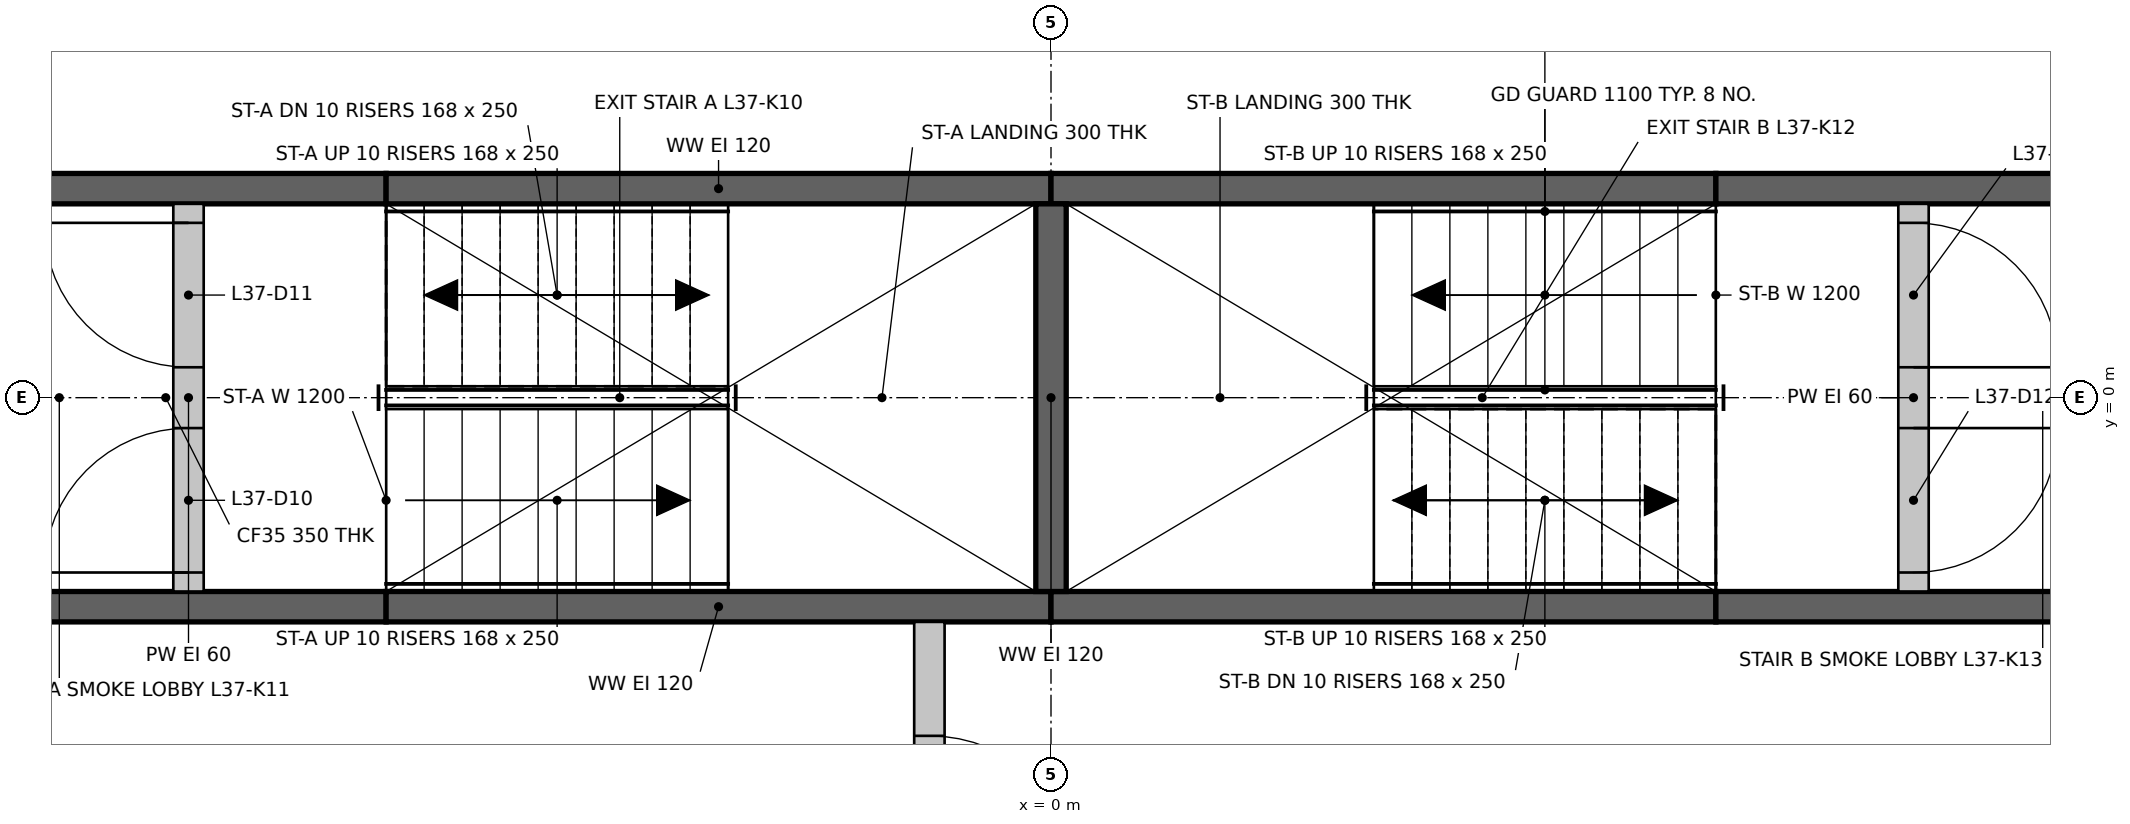
"""IFC4 building model, lengths in metres.
Left out: names, types, materials, properties, quantities, classifications, styles, units other than length and angle.
Written with IfcOpenShell. Run it as: python <this file> out.ifc"""

import sys

from ifc_helpers import new_model, si_unit, direction, frame, frame_2d, origin, place, context, subcontext, project, spatial, rectangle, extrude, element, fill, save


model = new_model("IFC4")
c1 = context("Model", 3, precision=1e-05, world=origin(), true_north=direction((0.0, 1.0)))
c2 = subcontext(c1, "Body", "Model", "MODEL_VIEW")
j1 = project(units=[si_unit("LENGTHUNIT", "METRE"), si_unit("PLANEANGLEUNIT", "RADIAN")], contexts=[c1])
p1 = place(None, origin())
s1 = spatial("IfcSite", under=j1, at=p1, CompositionType="ELEMENT")
p2 = place(p1, origin())
s2 = spatial("IfcBuilding", under=s1, at=p2, CompositionType="ELEMENT")
p3 = place(p2, frame((0.0, 0.0, 147.75)))
s3 = spatial("IfcBuildingStorey", under=s2, at=p3, CompositionType="ELEMENT", Elevation=147.75)
p4 = place(p3, frame((-7.274, -1.375, 0.0), z_axis=(0.0, 0.0, 1.0), x_axis=(1.0, 0.0, 0.0)))
e1 = element("IfcWall", 1, at=p4, inside=s3, PredefinedType="SHEAR", context=c2, shape_type="SweptSolid", body=[
    extrude(rectangle(XDim=2.9, YDim=0.2, at=frame_2d((1.45, 0.0))), origin(), (0.0, 0.0, 1.0), 3.0),
])
for number, where, z_axis, x_axis in (
    (2, (-4.374, -1.375, 0.0), (0.0, 0.0, 1.0), (1.0, 0.0, 0.0)),
    (3, (0.0, -1.375, 0.0), (0.0, 0.0, 1.0), (1.0, 0.0, 0.0)),
):
    element("IfcWall", number, at=place(p3, frame(where, z_axis=z_axis, x_axis=x_axis)), inside=s3, PredefinedType="SHEAR", context=c2, shape_type="SweptSolid", body=[
        extrude(rectangle(XDim=4.374, YDim=0.2, at=frame_2d((2.187, 0.0))), origin(), (0.0, 0.0, 1.0), 3.0),
    ])
for number, where, z_axis, x_axis in (
    (4, (4.374, -1.375, 0.0), (0.0, 0.0, 1.0), (1.0, 0.0, 0.0)),
    (5, (-7.274, 1.375, 0.0), (0.0, 0.0, 1.0), (1.0, 0.0, 0.0)),
):
    element("IfcWall", number, at=place(p3, frame(where, z_axis=z_axis, x_axis=x_axis)), inside=s3, PredefinedType="SHEAR", context=c2, shape_type="SweptSolid", body=[
        extrude(rectangle(XDim=2.9, YDim=0.2, at=frame_2d((1.45, 0.0))), origin(), (0.0, 0.0, 1.0), 3.0),
    ])
for number, where, z_axis, x_axis in (
    (6, (-4.374, 1.375, 0.0), (0.0, 0.0, 1.0), (1.0, 0.0, 0.0)),
    (7, (0.0, 1.375, 0.0), (0.0, 0.0, 1.0), (1.0, 0.0, 0.0)),
):
    element("IfcWall", number, at=place(p3, frame(where, z_axis=z_axis, x_axis=x_axis)), inside=s3, PredefinedType="SHEAR", context=c2, shape_type="SweptSolid", body=[
        extrude(rectangle(XDim=4.374, YDim=0.2, at=frame_2d((2.187, 0.0))), origin(), (0.0, 0.0, 1.0), 3.0),
    ])
p5 = place(p3, frame((4.374, 1.375, 0.0), z_axis=(0.0, 0.0, 1.0), x_axis=(1.0, 0.0, 0.0)))
e8 = element("IfcWall", 8, at=p5, inside=s3, PredefinedType="SHEAR", context=c2, shape_type="SweptSolid", body=[
    extrude(rectangle(XDim=2.9, YDim=0.2, at=frame_2d((1.45, 0.0))), origin(), (0.0, 0.0, 1.0), 3.0),
])
p6 = place(p3, frame((0.0, -1.275, 0.0), z_axis=(0.0, 0.0, 1.0), x_axis=(0.0, 1.0, 0.0)))
e9 = element("IfcWall", 9, at=p6, inside=s3, PredefinedType="SHEAR", context=c2, shape_type="SweptSolid", body=[
    extrude(rectangle(XDim=2.55, YDim=0.2, at=frame_2d((1.275, 0.0))), origin(), (0.0, 0.0, 1.0), 3.0),
])
p7 = place(p3, frame((-0.8, -3.974, 0.0), z_axis=(0.0, 0.0, 1.0), x_axis=(0.0, 1.0, 0.0)))
e10 = element("IfcWall", 10, at=p7, inside=s3, PredefinedType="PARTITIONING", context=c2, shape_type="SweptSolid", body=[
    extrude(rectangle(XDim=2.499, YDim=0.2, at=frame_2d((1.25, 0.0))), origin(), (0.0, 0.0, 1.0), 3.0),
])
p8 = place(p7, frame((0.75, 0.0, 0.0)))
e11 = element("IfcOpeningElement", 11, at=p8, cuts=e10, PredefinedType="OPENING", context=c2, shape_type="SweptSolid", body=[
    extrude(rectangle(XDim=1.0, YDim=2.1, at=frame_2d((0.5, 1.05))), frame((0.0, 0.11, 0.0), z_axis=(0.0, -1.0, 0.0), x_axis=(1.0, 0.0, 0.0)), (0.0, 0.0, 1.0), 0.22),
])
p9 = place(p3, frame((-5.674, -1.275, 0.0), z_axis=(0.0, 0.0, 1.0), x_axis=(0.0, 1.0, 0.0)))
e12 = element("IfcWall", 12, at=p9, inside=s3, PredefinedType="PARTITIONING", context=c2, shape_type="SweptSolid", body=[
    extrude(rectangle(XDim=2.55, YDim=0.2, at=frame_2d((1.275, 0.0))), origin(), (0.0, 0.0, 1.0), 3.0),
])
p10 = place(p9, frame((0.125, 0.0, 0.0)))
e13 = element("IfcOpeningElement", 13, at=p10, cuts=e12, PredefinedType="OPENING", context=c2, shape_type="SweptSolid", body=[
    extrude(rectangle(XDim=0.95, YDim=2.1, at=frame_2d((0.475, 1.05))), frame((0.0, 0.11, 0.0), z_axis=(0.0, -1.0, 0.0), x_axis=(1.0, 0.0, 0.0)), (0.0, 0.0, 1.0), 0.22),
])
p11 = place(p9, frame((1.475, 0.0, 0.0)))
e14 = element("IfcOpeningElement", 14, at=p11, cuts=e12, PredefinedType="OPENING", context=c2, shape_type="SweptSolid", body=[
    extrude(rectangle(XDim=0.95, YDim=2.1, at=frame_2d((0.475, 1.05))), frame((0.0, 0.11, 0.0), z_axis=(0.0, -1.0, 0.0), x_axis=(1.0, 0.0, 0.0)), (0.0, 0.0, 1.0), 0.22),
])
p12 = place(p3, frame((5.674, -1.275, 0.0), z_axis=(0.0, 0.0, 1.0), x_axis=(0.0, 1.0, 0.0)))
e15 = element("IfcWall", 15, at=p12, inside=s3, PredefinedType="PARTITIONING", context=c2, shape_type="SweptSolid", body=[
    extrude(rectangle(XDim=2.55, YDim=0.2, at=frame_2d((1.275, 0.0))), origin(), (0.0, 0.0, 1.0), 3.0),
])
p13 = place(p12, frame((0.125, 0.0, 0.0)))
e16 = element("IfcOpeningElement", 16, at=p13, cuts=e15, PredefinedType="OPENING", context=c2, shape_type="SweptSolid", body=[
    extrude(rectangle(XDim=0.95, YDim=2.1, at=frame_2d((0.475, 1.05))), frame((0.0, 0.11, 0.0), z_axis=(0.0, -1.0, 0.0), x_axis=(1.0, 0.0, 0.0)), (0.0, 0.0, 1.0), 0.22),
])
p14 = place(p12, frame((1.475, 0.0, 0.0)))
e17 = element("IfcOpeningElement", 17, at=p14, cuts=e15, PredefinedType="OPENING", context=c2, shape_type="SweptSolid", body=[
    extrude(rectangle(XDim=0.95, YDim=2.1, at=frame_2d((0.475, 1.05))), frame((0.0, 0.11, 0.0), z_axis=(0.0, -1.0, 0.0), x_axis=(1.0, 0.0, 0.0)), (0.0, 0.0, 1.0), 0.22),
])
p15 = place(p10, origin())
e18 = element("IfcDoor", 18, at=p15, inside=s3, OperationType="SINGLE_SWING_LEFT", PredefinedType="DOOR", context=c2, shape_type="SweptSolid", body=[
    extrude(rectangle(XDim=0.95, YDim=2.1, at=frame_2d((0.475, 1.05))), frame((0.0, 0.025, 0.0), z_axis=(0.0, -1.0, 0.0), x_axis=(1.0, 0.0, 0.0)), (0.0, 0.0, 1.0), 0.05),
])
fill(e13, e18)
p16 = place(p11, origin())
e19 = element("IfcDoor", 19, at=p16, inside=s3, OperationType="SINGLE_SWING_RIGHT", PredefinedType="DOOR", context=c2, shape_type="SweptSolid", body=[
    extrude(rectangle(XDim=0.95, YDim=2.1, at=frame_2d((0.475, 1.05))), frame((0.0, 0.025, 0.0), z_axis=(0.0, -1.0, 0.0), x_axis=(1.0, 0.0, 0.0)), (0.0, 0.0, 1.0), 0.05),
])
fill(e14, e19)
p17 = place(p13, frame((0.95, 0.0, 0.0), z_axis=(0.0, 0.0, 1.0), x_axis=(-1.0, 0.0, 0.0)))
e20 = element("IfcDoor", 20, at=p17, inside=s3, OperationType="SINGLE_SWING_RIGHT", PredefinedType="DOOR", context=c2, shape_type="SweptSolid", body=[
    extrude(rectangle(XDim=0.95, YDim=2.1, at=frame_2d((0.475, 1.05))), frame((0.0, 0.025, 0.0), z_axis=(0.0, -1.0, 0.0), x_axis=(1.0, 0.0, 0.0)), (0.0, 0.0, 1.0), 0.05),
])
fill(e16, e20)
p18 = place(p14, frame((0.95, 0.0, 0.0), z_axis=(0.0, 0.0, 1.0), x_axis=(-1.0, 0.0, 0.0)))
e21 = element("IfcDoor", 21, at=p18, inside=s3, OperationType="SINGLE_SWING_LEFT", PredefinedType="DOOR", context=c2, shape_type="SweptSolid", body=[
    extrude(rectangle(XDim=0.95, YDim=2.1, at=frame_2d((0.475, 1.05))), frame((0.0, 0.025, 0.0), z_axis=(0.0, -1.0, 0.0), x_axis=(1.0, 0.0, 0.0)), (0.0, 0.0, 1.0), 0.05),
])
fill(e17, e21)
p19 = place(p8, frame((1.0, 0.0, 0.0), z_axis=(0.0, 0.0, 1.0), x_axis=(-1.0, 0.0, 0.0)))
e22 = element("IfcDoor", 22, at=p19, inside=s3, OperationType="SINGLE_SWING_LEFT", PredefinedType="DOOR", context=c2, shape_type="SweptSolid", body=[
    extrude(rectangle(XDim=1.0, YDim=2.1, at=frame_2d((0.5, 1.05))), frame((0.0, 0.025, 0.0), z_axis=(0.0, -1.0, 0.0), x_axis=(1.0, 0.0, 0.0)), (0.0, 0.0, 1.0), 0.05),
])
fill(e11, e22)
save(model, sys.argv[1])
